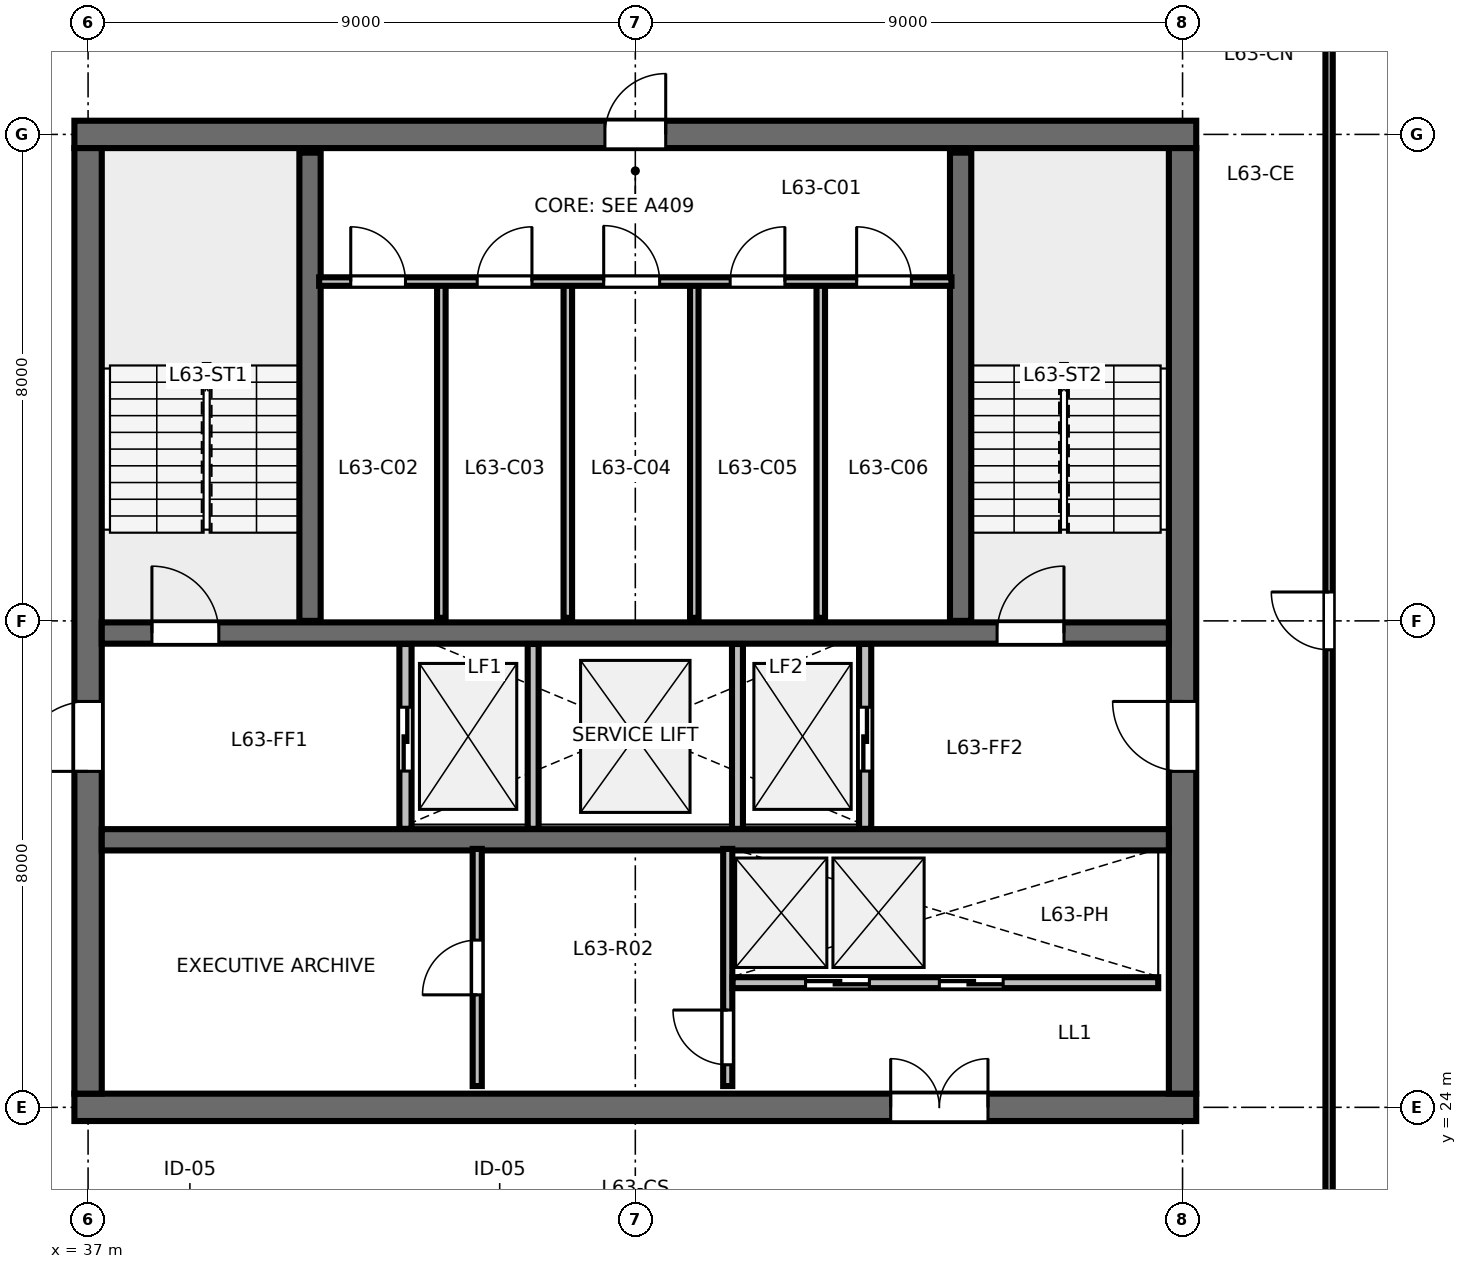
"""IFC4 building model, lengths in metres.
Left out: names, types, materials, properties, quantities, classifications, styles, units other than length and angle.
Written with IfcOpenShell. Run it as: python <this file> out.ifc"""

import sys

from ifc_helpers import new_model, si_unit, direction, frame, frame_2d, origin, place, context, subcontext, project, spatial, rectangle, extrude, element, fill, save


model = new_model("IFC4")
c1 = context("Model", 3, precision=1e-05, world=origin(), true_north=direction((0.0, 1.0)))
c2 = subcontext(c1, "Body", "Model", "MODEL_VIEW")
j1 = project(units=[si_unit("LENGTHUNIT", "METRE"), si_unit("PLANEANGLEUNIT", "RADIAN")], contexts=[c1])
p1 = place(None, origin())
s1 = spatial("IfcSite", under=j1, at=p1, CompositionType="ELEMENT")
p2 = place(p1, origin())
s2 = spatial("IfcBuilding", under=s1, at=p2, CompositionType="ELEMENT")
p3 = place(p2, frame((0.0, 0.0, 239.4)))
s3 = spatial("IfcBuildingStorey", under=s2, at=p3, CompositionType="ELEMENT", Elevation=239.4)
p4 = place(p3, frame((36.775, 24.0, 0.0), z_axis=(0.0, 0.0, 1.0), x_axis=(1.0, 0.0, 0.0)))
e1 = element("IfcWall", 1, at=p4, inside=s3, PredefinedType="SHEAR", context=c2, shape_type="SweptSolid", body=[
    extrude(rectangle(XDim=18.45, YDim=0.45, at=frame_2d((9.225, 0.0))), origin(), (0.0, 0.0, 1.0), 3.36),
])
p5 = place(p4, frame((13.425, 0.0, 0.0)))
e2 = element("IfcOpeningElement", 2, at=p5, cuts=e1, PredefinedType="OPENING", context=c2, shape_type="SweptSolid", body=[
    extrude(rectangle(XDim=1.6, YDim=2.15, at=frame_2d((0.8, 1.075))), frame((0.0, 0.235, 0.0), z_axis=(0.0, -1.0, 0.0), x_axis=(1.0, 0.0, 0.0)), (0.0, 0.0, 1.0), 0.47),
])
p6 = place(p3, frame((36.775, 40.0, 0.0), z_axis=(0.0, 0.0, 1.0), x_axis=(1.0, 0.0, 0.0)))
e3 = element("IfcWall", 3, at=p6, inside=s3, PredefinedType="SHEAR", context=c2, shape_type="SweptSolid", body=[
    extrude(rectangle(XDim=18.45, YDim=0.45, at=frame_2d((9.225, 0.0))), origin(), (0.0, 0.0, 1.0), 3.36),
])
p7 = place(p6, frame((8.725, 0.0, 0.0)))
e4 = element("IfcOpeningElement", 4, at=p7, cuts=e3, PredefinedType="OPENING", context=c2, shape_type="SweptSolid", body=[
    extrude(rectangle(XDim=1.0, YDim=2.15, at=frame_2d((0.5, 1.075))), frame((0.0, 0.235, 0.0), z_axis=(0.0, -1.0, 0.0), x_axis=(1.0, 0.0, 0.0)), (0.0, 0.0, 1.0), 0.47),
])
p8 = place(p3, frame((37.0, 24.225, 0.0), z_axis=(0.0, 0.0, 1.0), x_axis=(0.0, 1.0, 0.0)))
e5 = element("IfcWall", 5, at=p8, inside=s3, PredefinedType="SHEAR", context=c2, shape_type="SweptSolid", body=[
    extrude(rectangle(XDim=15.55, YDim=0.45, at=frame_2d((7.775, 0.0))), origin(), (0.0, 0.0, 1.0), 3.36),
])
p9 = place(p8, frame((5.3, 0.0, 0.0)))
e6 = element("IfcOpeningElement", 6, at=p9, cuts=e5, PredefinedType="OPENING", context=c2, shape_type="SweptSolid", body=[
    extrude(rectangle(XDim=1.15, YDim=2.15, at=frame_2d((0.575, 1.075))), frame((0.0, 0.235, 0.0), z_axis=(0.0, -1.0, 0.0), x_axis=(1.0, 0.0, 0.0)), (0.0, 0.0, 1.0), 0.47),
])
p10 = place(p3, frame((55.0, 24.225, 0.0), z_axis=(0.0, 0.0, 1.0), x_axis=(0.0, 1.0, 0.0)))
e7 = element("IfcWall", 7, at=p10, inside=s3, PredefinedType="SHEAR", context=c2, shape_type="SweptSolid", body=[
    extrude(rectangle(XDim=15.55, YDim=0.45, at=frame_2d((7.775, 0.0))), origin(), (0.0, 0.0, 1.0), 3.36),
])
p11 = place(p10, frame((5.3, 0.0, 0.0)))
e8 = element("IfcOpeningElement", 8, at=p11, cuts=e7, PredefinedType="OPENING", context=c2, shape_type="SweptSolid", body=[
    extrude(rectangle(XDim=1.15, YDim=2.15, at=frame_2d((0.575, 1.075))), frame((0.0, 0.235, 0.0), z_axis=(0.0, -1.0, 0.0), x_axis=(1.0, 0.0, 0.0)), (0.0, 0.0, 1.0), 0.47),
])
p12 = place(p3, frame((37.225, 31.8, 0.0), z_axis=(0.0, 0.0, 1.0), x_axis=(1.0, 0.0, 0.0)))
e9 = element("IfcWall", 9, at=p12, inside=s3, PredefinedType="SHEAR", context=c2, shape_type="SweptSolid", body=[
    extrude(rectangle(XDim=17.55, YDim=0.35, at=frame_2d((8.775, 0.0))), origin(), (0.0, 0.0, 1.0), 3.36),
])
p13 = place(p12, frame((0.825, 0.0, 0.0)))
e10 = element("IfcOpeningElement", 10, at=p13, cuts=e9, PredefinedType="OPENING", context=c2, shape_type="SweptSolid", body=[
    extrude(rectangle(XDim=1.1, YDim=2.15, at=frame_2d((0.55, 1.075))), frame((0.0, 0.185, 0.0), z_axis=(0.0, -1.0, 0.0), x_axis=(1.0, 0.0, 0.0)), (0.0, 0.0, 1.0), 0.37),
])
p14 = place(p12, frame((14.725, 0.0, 0.0)))
e11 = element("IfcOpeningElement", 11, at=p14, cuts=e9, PredefinedType="OPENING", context=c2, shape_type="SweptSolid", body=[
    extrude(rectangle(XDim=1.1, YDim=2.15, at=frame_2d((0.55, 1.075))), frame((0.0, 0.185, 0.0), z_axis=(0.0, -1.0, 0.0), x_axis=(1.0, 0.0, 0.0)), (0.0, 0.0, 1.0), 0.37),
])
p15 = place(p3, frame((37.225, 28.4, 0.0), z_axis=(0.0, 0.0, 1.0), x_axis=(1.0, 0.0, 0.0)))
e12 = element("IfcWall", 12, at=p15, inside=s3, PredefinedType="SHEAR", context=c2, shape_type="SweptSolid", body=[
    extrude(rectangle(XDim=17.55, YDim=0.35, at=frame_2d((8.775, 0.0))), origin(), (0.0, 0.0, 1.0), 3.36),
])
for number, where, z_axis, x_axis in (
    (13, (40.65, 32.0, 0.0), (0.0, 0.0, 1.0), (0.0, 1.0, 0.0)),
    (14, (51.35, 32.0, 0.0), (0.0, 0.0, 1.0), (0.0, 1.0, 0.0)),
):
    element("IfcWall", number, at=place(p3, frame(where, z_axis=z_axis, x_axis=x_axis)), inside=s3, PredefinedType="SHEAR", context=c2, shape_type="SweptSolid", body=[
        extrude(rectangle(XDim=7.7, YDim=0.35, at=frame_2d((3.85, 0.0))), origin(), (0.0, 0.0, 1.0), 3.6),
    ])
for number, where, z_axis, x_axis in (
    (15, (42.81, 32.05, 0.0), (0.0, 0.0, 1.0), (0.0, 1.0, 0.0)),
    (16, (44.89, 32.05, 0.0), (0.0, 0.0, 1.0), (0.0, 1.0, 0.0)),
    (17, (46.97, 32.05, 0.0), (0.0, 0.0, 1.0), (0.0, 1.0, 0.0)),
    (18, (49.05, 32.05, 0.0), (0.0, 0.0, 1.0), (0.0, 1.0, 0.0)),
):
    element("IfcWall", number, at=place(p3, frame(where, z_axis=z_axis, x_axis=x_axis)), inside=s3, PredefinedType="PARTITIONING", context=c2, shape_type="SweptSolid", body=[
        extrude(rectangle(XDim=5.5, YDim=0.14, at=frame_2d((2.75, 0.0))), origin(), (0.0, 0.0, 1.0), 3.375),
    ])
p16 = place(p3, frame((40.8, 37.58, 0.0), z_axis=(0.0, 0.0, 1.0), x_axis=(1.0, 0.0, 0.0)))
e19 = element("IfcWall", 19, at=p16, inside=s3, PredefinedType="PARTITIONING", context=c2, shape_type="SweptSolid", body=[
    extrude(rectangle(XDim=10.4, YDim=0.14, at=frame_2d((5.2, 0.0))), origin(), (0.0, 0.0, 1.0), 3.375),
])
p17 = place(p16, frame((0.52, 0.0, 0.0)))
e20 = element("IfcOpeningElement", 20, at=p17, cuts=e19, PredefinedType="OPENING", context=c2, shape_type="SweptSolid", body=[
    extrude(rectangle(XDim=0.9, YDim=2.15, at=frame_2d((0.45, 1.075))), frame((0.0, 0.08, 0.0), z_axis=(0.0, -1.0, 0.0), x_axis=(1.0, 0.0, 0.0)), (0.0, 0.0, 1.0), 0.16),
])
p18 = place(p16, frame((2.6, 0.0, 0.0)))
e21 = element("IfcOpeningElement", 21, at=p18, cuts=e19, PredefinedType="OPENING", context=c2, shape_type="SweptSolid", body=[
    extrude(rectangle(XDim=0.9, YDim=2.15, at=frame_2d((0.45, 1.075))), frame((0.0, 0.08, 0.0), z_axis=(0.0, -1.0, 0.0), x_axis=(1.0, 0.0, 0.0)), (0.0, 0.0, 1.0), 0.16),
])
p19 = place(p16, frame((4.68, 0.0, 0.0)))
e22 = element("IfcOpeningElement", 22, at=p19, cuts=e19, PredefinedType="OPENING", context=c2, shape_type="SweptSolid", body=[
    extrude(rectangle(XDim=0.92, YDim=2.15, at=frame_2d((0.46, 1.075))), frame((0.0, 0.08, 0.0), z_axis=(0.0, -1.0, 0.0), x_axis=(1.0, 0.0, 0.0)), (0.0, 0.0, 1.0), 0.16),
])
p20 = place(p16, frame((6.76, 0.0, 0.0)))
e23 = element("IfcOpeningElement", 23, at=p20, cuts=e19, PredefinedType="OPENING", context=c2, shape_type="SweptSolid", body=[
    extrude(rectangle(XDim=0.9, YDim=2.15, at=frame_2d((0.45, 1.075))), frame((0.0, 0.08, 0.0), z_axis=(0.0, -1.0, 0.0), x_axis=(1.0, 0.0, 0.0)), (0.0, 0.0, 1.0), 0.16),
])
p21 = place(p16, frame((8.84, 0.0, 0.0)))
e24 = element("IfcOpeningElement", 24, at=p21, cuts=e19, PredefinedType="OPENING", context=c2, shape_type="SweptSolid", body=[
    extrude(rectangle(XDim=0.9, YDim=2.15, at=frame_2d((0.45, 1.075))), frame((0.0, 0.08, 0.0), z_axis=(0.0, -1.0, 0.0), x_axis=(1.0, 0.0, 0.0)), (0.0, 0.0, 1.0), 0.16),
])
p22 = place(p3, frame((42.22, 28.58, 0.0), z_axis=(0.0, 0.0, 1.0), x_axis=(0.0, 1.0, 0.0)))
e25 = element("IfcWall", 25, at=p22, inside=s3, PredefinedType="PARTITIONING", context=c2, shape_type="SweptSolid", body=[
    extrude(rectangle(XDim=3.04, YDim=0.2, at=frame_2d((1.52, 0.0))), origin(), (0.0, 0.0, 1.0), 3.375),
])
p23 = place(p22, frame((0.95, 0.0, 0.0)))
e26 = element("IfcOpeningElement", 26, at=p23, cuts=e25, PredefinedType="OPENING", context=c2, shape_type="SweptSolid", body=[
    extrude(rectangle(XDim=1.05, YDim=2.15, at=frame_2d((0.525, 1.075))), frame((0.0, 0.11, 0.0), z_axis=(0.0, -1.0, 0.0), x_axis=(1.0, 0.0, 0.0)), (0.0, 0.0, 1.0), 0.22),
])
p24 = place(p3, frame((49.78, 28.58, 0.0), z_axis=(0.0, 0.0, 1.0), x_axis=(0.0, 1.0, 0.0)))
e27 = element("IfcWall", 27, at=p24, inside=s3, PredefinedType="PARTITIONING", context=c2, shape_type="SweptSolid", body=[
    extrude(rectangle(XDim=3.04, YDim=0.2, at=frame_2d((1.52, 0.0))), origin(), (0.0, 0.0, 1.0), 3.375),
])
p25 = place(p24, frame((0.95, 0.0, 0.0)))
e28 = element("IfcOpeningElement", 28, at=p25, cuts=e27, PredefinedType="OPENING", context=c2, shape_type="SweptSolid", body=[
    extrude(rectangle(XDim=1.05, YDim=2.15, at=frame_2d((0.525, 1.075))), frame((0.0, 0.11, 0.0), z_axis=(0.0, -1.0, 0.0), x_axis=(1.0, 0.0, 0.0)), (0.0, 0.0, 1.0), 0.22),
])
for number, where, z_axis, x_axis in (
    (29, (44.32, 28.58, 0.0), (0.0, 0.0, 1.0), (0.0, 1.0, 0.0)),
    (30, (47.68, 28.58, 0.0), (0.0, 0.0, 1.0), (0.0, 1.0, 0.0)),
):
    element("IfcWall", number, at=place(p3, frame(where, z_axis=z_axis, x_axis=x_axis)), inside=s3, PredefinedType="PARTITIONING", context=c2, shape_type="SweptSolid", body=[
        extrude(rectangle(XDim=3.04, YDim=0.18, at=frame_2d((1.52, 0.0))), origin(), (0.0, 0.0, 1.0), 3.375),
    ])
p26 = place(p3, frame((43.4, 24.35, 0.0), z_axis=(0.0, 0.0, 1.0), x_axis=(0.0, 1.0, 0.0)))
e31 = element("IfcWall", 31, at=p26, inside=s3, PredefinedType="PARTITIONING", context=c2, shape_type="SweptSolid", body=[
    extrude(rectangle(XDim=3.9, YDim=0.15, at=frame_2d((1.95, 0.0))), origin(), (0.0, 0.0, 1.0), 3.375),
])
p27 = place(p26, frame((1.5, 0.0, 0.0)))
e32 = element("IfcOpeningElement", 32, at=p27, cuts=e31, PredefinedType="OPENING", context=c2, shape_type="SweptSolid", body=[
    extrude(rectangle(XDim=0.9, YDim=2.15, at=frame_2d((0.45, 1.075))), frame((0.0, 0.085, 0.0), z_axis=(0.0, -1.0, 0.0), x_axis=(1.0, 0.0, 0.0)), (0.0, 0.0, 1.0), 0.17),
])
p28 = place(p3, frame((47.52, 24.35, 0.0), z_axis=(0.0, 0.0, 1.0), x_axis=(0.0, 1.0, 0.0)))
e33 = element("IfcWall", 33, at=p28, inside=s3, PredefinedType="PARTITIONING", context=c2, shape_type="SweptSolid", body=[
    extrude(rectangle(XDim=3.9, YDim=0.15, at=frame_2d((1.95, 0.0))), origin(), (0.0, 0.0, 1.0), 3.375),
])
p29 = place(p28, frame((0.35, 0.0, 0.0)))
e34 = element("IfcOpeningElement", 34, at=p29, cuts=e33, PredefinedType="OPENING", context=c2, shape_type="SweptSolid", body=[
    extrude(rectangle(XDim=0.9, YDim=2.15, at=frame_2d((0.45, 1.075))), frame((0.0, 0.085, 0.0), z_axis=(0.0, -1.0, 0.0), x_axis=(1.0, 0.0, 0.0)), (0.0, 0.0, 1.0), 0.17),
])
p30 = place(p3, frame((47.6, 26.05, 0.0), z_axis=(0.0, 0.0, 1.0), x_axis=(1.0, 0.0, 0.0)))
e35 = element("IfcWall", 35, at=p30, inside=s3, PredefinedType="PARTITIONING", context=c2, shape_type="SweptSolid", body=[
    extrude(rectangle(XDim=7.0, YDim=0.18, at=frame_2d((3.5, 0.0))), origin(), (0.0, 0.0, 1.0), 3.375),
])
p31 = place(p30, frame((1.2, 0.0, 0.0)))
e36 = element("IfcOpeningElement", 36, at=p31, cuts=e35, PredefinedType="OPENING", context=c2, shape_type="SweptSolid", body=[
    extrude(rectangle(XDim=1.05, YDim=2.15, at=frame_2d((0.525, 1.075))), frame((0.0, 0.1, 0.0), z_axis=(0.0, -1.0, 0.0), x_axis=(1.0, 0.0, 0.0)), (0.0, 0.0, 1.0), 0.2),
])
p32 = place(p30, frame((3.4, 0.0, 0.0)))
e37 = element("IfcOpeningElement", 37, at=p32, cuts=e35, PredefinedType="OPENING", context=c2, shape_type="SweptSolid", body=[
    extrude(rectangle(XDim=1.05, YDim=2.15, at=frame_2d((0.525, 1.075))), frame((0.0, 0.1, 0.0), z_axis=(0.0, -1.0, 0.0), x_axis=(1.0, 0.0, 0.0)), (0.0, 0.0, 1.0), 0.2),
])
p33 = place(p3, frame((57.41, 21.65, 0.0), z_axis=(0.0, 0.0, 1.0), x_axis=(0.0, 1.0, 0.0)))
e38 = element("IfcWall", 38, at=p33, inside=s3, PredefinedType="PARTITIONING", context=c2, shape_type="SweptSolid", body=[
    extrude(rectangle(XDim=20.7, YDim=0.12, at=frame_2d((10.35, 0.0))), origin(), (0.0, 0.0, 1.0), 2.655),
])
p34 = place(p33, frame((9.875, 0.0, 0.0)))
e39 = element("IfcOpeningElement", 39, at=p34, cuts=e38, PredefinedType="OPENING", context=c2, shape_type="SweptSolid", body=[
    extrude(rectangle(XDim=0.95, YDim=2.15, at=frame_2d((0.475, 1.075))), frame((0.0, 0.07, 0.0), z_axis=(0.0, -1.0, 0.0), x_axis=(1.0, 0.0, 0.0)), (0.0, 0.0, 1.0), 0.14),
])
p35 = place(p13, origin())
e40 = element("IfcDoor", 40, at=p35, inside=s3, OperationType="SINGLE_SWING_LEFT", PredefinedType="DOOR", context=c2, shape_type="SweptSolid", body=[
    extrude(rectangle(XDim=1.1, YDim=2.15, at=frame_2d((0.55, 1.075))), frame((0.0, 0.025, 0.0), z_axis=(0.0, -1.0, 0.0), x_axis=(1.0, 0.0, 0.0)), (0.0, 0.0, 1.0), 0.05),
])
fill(e10, e40)
p36 = place(p14, origin())
e41 = element("IfcDoor", 41, at=p36, inside=s3, OperationType="SINGLE_SWING_RIGHT", PredefinedType="DOOR", context=c2, shape_type="SweptSolid", body=[
    extrude(rectangle(XDim=1.1, YDim=2.15, at=frame_2d((0.55, 1.075))), frame((0.0, 0.025, 0.0), z_axis=(0.0, -1.0, 0.0), x_axis=(1.0, 0.0, 0.0)), (0.0, 0.0, 1.0), 0.05),
])
fill(e11, e41)
p37 = place(p7, origin())
e42 = element("IfcDoor", 42, at=p37, inside=s3, OperationType="SINGLE_SWING_RIGHT", PredefinedType="DOOR", context=c2, shape_type="SweptSolid", body=[
    extrude(rectangle(XDim=1.0, YDim=2.15, at=frame_2d((0.5, 1.075))), frame((0.0, 0.025, 0.0), z_axis=(0.0, -1.0, 0.0), x_axis=(1.0, 0.0, 0.0)), (0.0, 0.0, 1.0), 0.05),
])
fill(e4, e42)
p38 = place(p9, origin())
e43 = element("IfcDoor", 43, at=p38, inside=s3, OperationType="SINGLE_SWING_LEFT", PredefinedType="DOOR", context=c2, shape_type="SweptSolid", body=[
    extrude(rectangle(XDim=1.15, YDim=2.15, at=frame_2d((0.575, 1.075))), frame((0.0, 0.025, 0.0), z_axis=(0.0, -1.0, 0.0), x_axis=(1.0, 0.0, 0.0)), (0.0, 0.0, 1.0), 0.05),
])
fill(e6, e43)
p39 = place(p11, origin())
e44 = element("IfcDoor", 44, at=p39, inside=s3, OperationType="SINGLE_SWING_RIGHT", PredefinedType="DOOR", context=c2, shape_type="SweptSolid", body=[
    extrude(rectangle(XDim=1.15, YDim=2.15, at=frame_2d((0.575, 1.075))), frame((0.0, 0.025, 0.0), z_axis=(0.0, -1.0, 0.0), x_axis=(1.0, 0.0, 0.0)), (0.0, 0.0, 1.0), 0.05),
])
fill(e8, e44)
p40 = place(p5, origin())
e45 = element("IfcDoor", 45, at=p40, inside=s3, OperationType="DOUBLE_DOOR_SINGLE_SWING", PredefinedType="DOOR", context=c2, shape_type="SweptSolid", body=[
    extrude(rectangle(XDim=1.6, YDim=2.15, at=frame_2d((0.8, 1.075))), frame((0.0, 0.025, 0.0), z_axis=(0.0, -1.0, 0.0), x_axis=(1.0, 0.0, 0.0)), (0.0, 0.0, 1.0), 0.05),
])
fill(e2, e45)
p41 = place(p17, origin())
e46 = element("IfcDoor", 46, at=p41, inside=s3, OperationType="SINGLE_SWING_LEFT", PredefinedType="DOOR", context=c2, shape_type="SweptSolid", body=[
    extrude(rectangle(XDim=0.9, YDim=2.15, at=frame_2d((0.45, 1.075))), frame((0.0, 0.025, 0.0), z_axis=(0.0, -1.0, 0.0), x_axis=(1.0, 0.0, 0.0)), (0.0, 0.0, 1.0), 0.05),
])
fill(e20, e46)
p42 = place(p18, origin())
e47 = element("IfcDoor", 47, at=p42, inside=s3, OperationType="SINGLE_SWING_RIGHT", PredefinedType="DOOR", context=c2, shape_type="SweptSolid", body=[
    extrude(rectangle(XDim=0.9, YDim=2.15, at=frame_2d((0.45, 1.075))), frame((0.0, 0.025, 0.0), z_axis=(0.0, -1.0, 0.0), x_axis=(1.0, 0.0, 0.0)), (0.0, 0.0, 1.0), 0.05),
])
fill(e21, e47)
p43 = place(p19, origin())
e48 = element("IfcDoor", 48, at=p43, inside=s3, OperationType="SINGLE_SWING_LEFT", PredefinedType="DOOR", context=c2, shape_type="SweptSolid", body=[
    extrude(rectangle(XDim=0.92, YDim=2.15, at=frame_2d((0.46, 1.075))), frame((0.0, 0.025, 0.0), z_axis=(0.0, -1.0, 0.0), x_axis=(1.0, 0.0, 0.0)), (0.0, 0.0, 1.0), 0.05),
])
fill(e22, e48)
p44 = place(p20, origin())
e49 = element("IfcDoor", 49, at=p44, inside=s3, OperationType="SINGLE_SWING_RIGHT", PredefinedType="DOOR", context=c2, shape_type="SweptSolid", body=[
    extrude(rectangle(XDim=0.9, YDim=2.15, at=frame_2d((0.45, 1.075))), frame((0.0, 0.025, 0.0), z_axis=(0.0, -1.0, 0.0), x_axis=(1.0, 0.0, 0.0)), (0.0, 0.0, 1.0), 0.05),
])
fill(e23, e49)
p45 = place(p21, origin())
e50 = element("IfcDoor", 50, at=p45, inside=s3, OperationType="SINGLE_SWING_LEFT", PredefinedType="DOOR", context=c2, shape_type="SweptSolid", body=[
    extrude(rectangle(XDim=0.9, YDim=2.15, at=frame_2d((0.45, 1.075))), frame((0.0, 0.025, 0.0), z_axis=(0.0, -1.0, 0.0), x_axis=(1.0, 0.0, 0.0)), (0.0, 0.0, 1.0), 0.05),
])
fill(e24, e50)
p46 = place(p23, origin())
e51 = element("IfcDoor", 51, at=p46, inside=s3, OperationType="SLIDING_TO_LEFT", PredefinedType="DOOR", context=c2, shape_type="SweptSolid", body=[
    extrude(rectangle(XDim=1.05, YDim=2.15, at=frame_2d((0.525, 1.075))), frame((0.0, 0.025, 0.0), z_axis=(0.0, -1.0, 0.0), x_axis=(1.0, 0.0, 0.0)), (0.0, 0.0, 1.0), 0.05),
])
fill(e26, e51)
p47 = place(p25, origin())
e52 = element("IfcDoor", 52, at=p47, inside=s3, OperationType="SLIDING_TO_RIGHT", PredefinedType="DOOR", context=c2, shape_type="SweptSolid", body=[
    extrude(rectangle(XDim=1.05, YDim=2.15, at=frame_2d((0.525, 1.075))), frame((0.0, 0.025, 0.0), z_axis=(0.0, -1.0, 0.0), x_axis=(1.0, 0.0, 0.0)), (0.0, 0.0, 1.0), 0.05),
])
fill(e28, e52)
p48 = place(p27, origin())
e53 = element("IfcDoor", 53, at=p48, inside=s3, OperationType="SINGLE_SWING_LEFT", PredefinedType="DOOR", context=c2, shape_type="SweptSolid", body=[
    extrude(rectangle(XDim=0.9, YDim=2.15, at=frame_2d((0.45, 1.075))), frame((0.0, 0.025, 0.0), z_axis=(0.0, -1.0, 0.0), x_axis=(1.0, 0.0, 0.0)), (0.0, 0.0, 1.0), 0.05),
])
fill(e32, e53)
p49 = place(p29, origin())
e54 = element("IfcDoor", 54, at=p49, inside=s3, OperationType="SINGLE_SWING_RIGHT", PredefinedType="DOOR", context=c2, shape_type="SweptSolid", body=[
    extrude(rectangle(XDim=0.9, YDim=2.15, at=frame_2d((0.45, 1.075))), frame((0.0, 0.025, 0.0), z_axis=(0.0, -1.0, 0.0), x_axis=(1.0, 0.0, 0.0)), (0.0, 0.0, 1.0), 0.05),
])
fill(e34, e54)
p50 = place(p31, origin())
e55 = element("IfcDoor", 55, at=p50, inside=s3, OperationType="SLIDING_TO_LEFT", PredefinedType="DOOR", context=c2, shape_type="SweptSolid", body=[
    extrude(rectangle(XDim=1.05, YDim=2.15, at=frame_2d((0.525, 1.075))), frame((0.0, 0.025, 0.0), z_axis=(0.0, -1.0, 0.0), x_axis=(1.0, 0.0, 0.0)), (0.0, 0.0, 1.0), 0.05),
])
fill(e36, e55)
p51 = place(p32, origin())
e56 = element("IfcDoor", 56, at=p51, inside=s3, OperationType="SLIDING_TO_RIGHT", PredefinedType="DOOR", context=c2, shape_type="SweptSolid", body=[
    extrude(rectangle(XDim=1.05, YDim=2.15, at=frame_2d((0.525, 1.075))), frame((0.0, 0.025, 0.0), z_axis=(0.0, -1.0, 0.0), x_axis=(1.0, 0.0, 0.0)), (0.0, 0.0, 1.0), 0.05),
])
fill(e37, e56)
p52 = place(p34, origin())
e57 = element("IfcDoor", 57, at=p52, inside=s3, OperationType="SINGLE_SWING_RIGHT", PredefinedType="DOOR", context=c2, shape_type="SweptSolid", body=[
    extrude(rectangle(XDim=0.95, YDim=2.15, at=frame_2d((0.475, 1.075))), frame((0.0, 0.025, 0.0), z_axis=(0.0, -1.0, 0.0), x_axis=(1.0, 0.0, 0.0)), (0.0, 0.0, 1.0), 0.05),
])
fill(e39, e57)
save(model, sys.argv[1])
